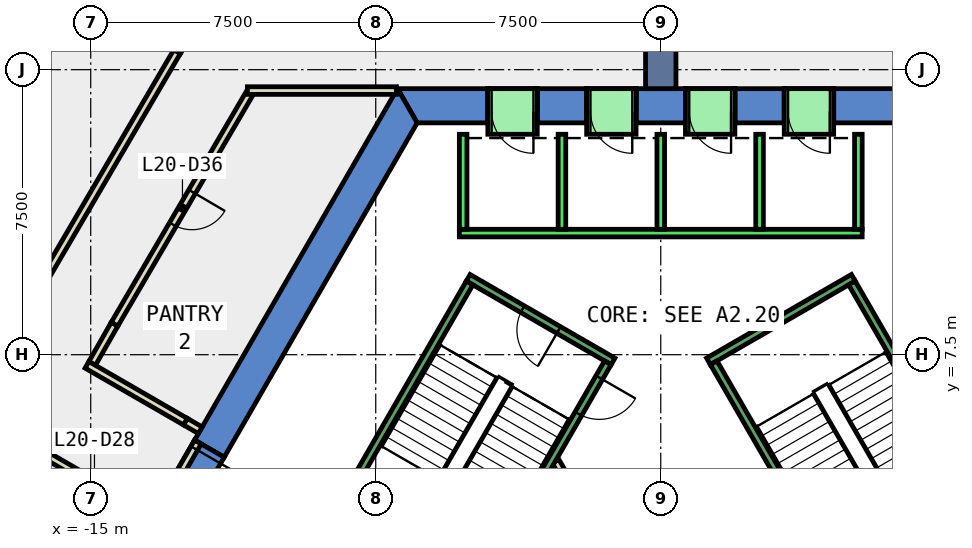
"""IFC4 building model, lengths in metres.
Left out: names, types, materials, properties, quantities, classifications, styles, units other than length and angle.
Written with IfcOpenShell. Run it as: python <this file> out.ifc"""

import sys

from ifc_helpers import new_model, si_unit, direction, frame, frame_2d, origin, place, context, subcontext, project, spatial, polyline, rectangle, outline, extrude, element, fill, save


model = new_model("IFC4")
c1 = context("Model", 3, precision=1e-05, world=origin(), true_north=direction((0.0, 1.0)))
c2 = subcontext(c1, "Body", "Model", "MODEL_VIEW")
j1 = project(units=[si_unit("LENGTHUNIT", "METRE"), si_unit("PLANEANGLEUNIT", "RADIAN")], contexts=[c1])
p1 = place(None, origin())
s1 = spatial("IfcSite", under=j1, at=p1, CompositionType="ELEMENT")
p2 = place(p1, origin())
s2 = spatial("IfcBuilding", under=s1, at=p2, CompositionType="ELEMENT")
p3 = place(p2, frame((0.0, 0.0, 95.0)))
s3 = spatial("IfcBuildingStorey", under=s2, at=p3, CompositionType="ELEMENT", Elevation=95.0)
p4 = place(p3, frame((0.0, 0.0, -0.4)))
e1 = element("IfcWall", 1, at=p4, inside=s3, PredefinedType="SHEAR", context=c2, shape_type="SweptSolid", body=[
    extrude(outline(polyline([(4.55, 14.5), (4.55, 13.6), (6.409, 13.6), (6.928, 14.5), (4.55, 14.5)])), origin(), (0.0, 0.0, 1.0), 4.2),
])
p5 = place(p3, frame((0.0, 0.0, -0.4)))
e2 = element("IfcWall", 2, at=p5, inside=s3, PredefinedType="SHEAR", context=c2, shape_type="SweptSolid", body=[
    extrude(outline(polyline([(1.95, 14.5), (1.95, 13.6), (3.25, 13.6), (3.25, 14.5), (1.95, 14.5)])), origin(), (0.0, 0.0, 1.0), 4.2),
])
p6 = place(p3, frame((0.0, 0.0, -0.4)))
e3 = element("IfcWall", 3, at=p6, inside=s3, PredefinedType="SHEAR", context=c2, shape_type="SweptSolid", body=[
    extrude(outline(polyline([(-0.65, 14.5), (-0.65, 13.6), (0.65, 13.6), (0.65, 14.5), (-0.65, 14.5)])), origin(), (0.0, 0.0, 1.0), 4.2),
])
p7 = place(p3, frame((0.0, 0.0, -0.4)))
e4 = element("IfcWall", 4, at=p7, inside=s3, PredefinedType="SHEAR", context=c2, shape_type="SweptSolid", body=[
    extrude(outline(polyline([(-3.25, 14.5), (-3.25, 13.6), (-1.95, 13.6), (-1.95, 14.5), (-3.25, 14.5)])), origin(), (0.0, 0.0, 1.0), 4.2),
])
p8 = place(p3, frame((0.0, 0.0, -0.4)))
e5 = element("IfcWall", 5, at=p8, inside=s3, PredefinedType="SHEAR", context=c2, shape_type="SweptSolid", body=[
    extrude(outline(polyline([(-4.55, 13.6), (-4.55, 14.5), (-6.928, 14.5), (-6.409, 13.6), (-4.55, 13.6)])), origin(), (0.0, 0.0, 1.0), 4.2),
])
p9 = place(p3, frame((0.0, 0.0, 3.6)))
e6 = element("IfcWall", 6, at=p9, inside=s3, PredefinedType="SHEAR", context=c2, shape_type="SweptSolid", body=[
    extrude(outline(polyline([(3.25, 14.5), (3.25, 13.6), (4.55, 13.6), (4.55, 14.5), (3.25, 14.5)])), origin(), (0.0, 0.0, 1.0), 0.2),
])
p10 = place(p3, frame((0.0, 0.0, 3.6)))
e7 = element("IfcWall", 7, at=p10, inside=s3, PredefinedType="SHEAR", context=c2, shape_type="SweptSolid", body=[
    extrude(outline(polyline([(0.65, 14.5), (0.65, 13.6), (1.95, 13.6), (1.95, 14.5), (0.65, 14.5)])), origin(), (0.0, 0.0, 1.0), 0.2),
])
p11 = place(p3, frame((0.0, 0.0, 3.6)))
e8 = element("IfcWall", 8, at=p11, inside=s3, PredefinedType="SHEAR", context=c2, shape_type="SweptSolid", body=[
    extrude(outline(polyline([(-1.95, 14.5), (-1.95, 13.6), (-0.65, 13.6), (-0.65, 14.5), (-1.95, 14.5)])), origin(), (0.0, 0.0, 1.0), 0.2),
])
p12 = place(p3, frame((0.0, 0.0, 3.6)))
e9 = element("IfcWall", 9, at=p12, inside=s3, PredefinedType="SHEAR", context=c2, shape_type="SweptSolid", body=[
    extrude(outline(polyline([(-4.55, 14.5), (-4.55, 13.6), (-3.25, 13.6), (-3.25, 14.5), (-4.55, 14.5)])), origin(), (0.0, 0.0, 1.0), 0.2),
])
p13 = place(p3, frame((0.0, 0.0, -0.4)))
e10 = element("IfcWall", 10, at=p13, inside=s3, PredefinedType="SHEAR", context=c2, shape_type="SweptSolid", body=[
    extrude(outline(polyline([(-12.267, 5.252), (-11.488, 4.802), (-6.409, 13.6), (-6.928, 14.5), (-12.267, 5.252)])), origin(), (0.0, 0.0, 1.0), 4.2),
])
p14 = place(p3, frame((0.0, 0.0, 3.6)))
e11 = element("IfcWall", 11, at=p14, inside=s3, PredefinedType="SHEAR", context=c2, shape_type="SweptSolid", body=[
    extrude(outline(polyline([(-13.267, 3.52), (-12.488, 3.07), (-11.488, 4.802), (-12.267, 5.252), (-13.267, 3.52)])), origin(), (0.0, 0.0, 1.0), 0.2),
])
p15 = place(p3, frame((0.0, 14.5, -0.4), z_axis=(0.0, 0.0, 1.0), x_axis=(0.0, 1.0, 0.0)))
e12 = element("IfcWall", 12, at=p15, inside=s3, PredefinedType="SHEAR", context=c2, shape_type="SweptSolid", body=[
    extrude(rectangle(XDim=9.0, YDim=0.8, at=frame_2d((4.5, 0.0))), origin(), (0.0, 0.0, 1.0), 4.2),
])
p16 = place(p3, frame((-10.797, 14.415, 0.0), z_axis=(0.0, 0.0, 1.0), x_axis=(-0.505008297342, -0.863114488128, 0.0)))
e13 = element("IfcWall", 13, at=p16, inside=s3, PredefinedType="PARTITIONING", context=c2, shape_type="SweptSolid", body=[
    extrude(rectangle(XDim=7.085, YDim=0.2, at=frame_2d((3.542, 0.0))), origin(), (0.0, 0.0, 1.0), 3.8),
])
p17 = place(p16, frame((3.043, 0.0, 0.0)))
e14 = element("IfcOpeningElement", 14, at=p17, cuts=e13, PredefinedType="OPENING", context=c2, shape_type="SweptSolid", body=[
    extrude(rectangle(XDim=1.0, YDim=2.1, at=frame_2d((0.5, 1.05))), frame((0.0, 0.11, 0.0), z_axis=(0.0, -1.0, 0.0), x_axis=(1.0, 0.0, 0.0)), (0.0, 0.0, 1.0), 0.22),
])
p18 = place(p3, frame((-14.375, 8.3, 0.0), z_axis=(0.0, 0.0, 1.0), x_axis=(-0.495074026382, -0.868850797549, 0.0)))
e15 = element("IfcWall", 15, at=p18, inside=s3, PredefinedType="PARTITIONING", context=c2, shape_type="SweptSolid", body=[
    extrude(rectangle(XDim=1.186, YDim=0.2, at=frame_2d((0.593, 0.0))), origin(), (0.0, 0.0, 1.0), 3.8),
])
p19 = place(p3, frame((-15.098, 7.233, 0.0), z_axis=(0.0, 0.0, 1.0), x_axis=(0.866101363304, -0.499868411168, 0.0)))
e16 = element("IfcWall", 16, at=p19, inside=s3, PredefinedType="PARTITIONING", context=c2, shape_type="SweptSolid", body=[
    extrude(rectangle(XDim=2.992, YDim=0.2, at=frame_2d((1.496, 0.0))), origin(), (0.0, 0.0, 1.0), 3.8),
])
p20 = place(p3, frame((-12.728, 15.473, 0.0), z_axis=(0.0, 0.0, 1.0), x_axis=(0.515010673306, 0.857183764651, 0.0)))
e17 = element("IfcWall", 17, at=p20, inside=s3, PredefinedType="PARTITIONING", context=c2, shape_type="SweptSolid", body=[
    extrude(rectangle(XDim=7.111, YDim=0.2, at=frame_2d((3.555, 0.0))), origin(), (0.0, 0.0, 1.0), 3.8),
])
p21 = place(p20, frame((3.13, 0.0, 0.0)))
e18 = element("IfcOpeningElement", 18, at=p21, cuts=e17, PredefinedType="OPENING", context=c2, shape_type="SweptSolid", body=[
    extrude(rectangle(XDim=1.0, YDim=2.1, at=frame_2d((0.5, 1.05))), frame((0.0, 0.11, 0.0), z_axis=(0.0, -1.0, 0.0), x_axis=(1.0, 0.0, 0.0)), (0.0, 0.0, 1.0), 0.22),
])
p22 = place(p3, frame((-16.281, 9.4, 0.0), z_axis=(0.0, 0.0, 1.0), x_axis=(0.504973069247, 0.863135099121, 0.0)))
e19 = element("IfcWall", 19, at=p22, inside=s3, PredefinedType="PARTITIONING", context=c2, shape_type="SweptSolid", body=[
    extrude(rectangle(XDim=7.036, YDim=0.2, at=frame_2d((3.518, 0.0))), origin(), (0.0, 0.0, 1.0), 3.8),
])
p23 = place(p3, frame((-2.771, 4.7, 0.0), z_axis=(0.0, 0.0, 1.0), x_axis=(0.499969479948, -0.866043023828, 0.0)))
e20 = element("IfcWall", 20, at=p23, inside=s3, PredefinedType="PARTITIONING", context=c2, shape_type="SweptSolid", body=[
    extrude(rectangle(XDim=4.99, YDim=0.2, at=frame_2d((2.495, 0.0))), origin(), (0.0, 0.0, 1.0), 3.8),
])
p24 = place(p23, frame((1.945, 0.0, 0.0)))
e21 = element("IfcOpeningElement", 21, at=p24, cuts=e20, PredefinedType="OPENING", context=c2, shape_type="SweptSolid", body=[
    extrude(rectangle(XDim=1.0, YDim=2.1, at=frame_2d((0.5, 1.05))), frame((0.0, 0.11, 0.0), z_axis=(0.0, -1.0, 0.0), x_axis=(1.0, 0.0, 0.0)), (0.0, 0.0, 1.0), 0.22),
])
p25 = place(p3, frame((-6.957, 14.45, 0.0), z_axis=(0.0, 0.0, 1.0), x_axis=(-1.0, 0.0, 0.0)))
e22 = element("IfcWall", 22, at=p25, inside=s3, PredefinedType="PARTITIONING", context=c2, shape_type="SweptSolid", body=[
    extrude(rectangle(XDim=3.92, YDim=0.2, at=frame_2d((1.96, 0.0))), origin(), (0.0, 0.0, 1.0), 3.8),
])
p26 = place(p3, frame((-12.18, 5.202, 0.0), z_axis=(0.0, 0.0, 1.0), x_axis=(-0.50002537861, -0.866010750942, 0.0)))
e23 = element("IfcWall", 23, at=p26, inside=s3, PredefinedType="PARTITIONING", context=c2, shape_type="SweptSolid", body=[
    extrude(rectangle(XDim=2.0, YDim=0.2, at=frame_2d((1.0, 0.0))), origin(), (0.0, 0.0, 1.0), 2.4),
])
p27 = place(p26, frame((0.19, 0.0, 0.0)))
e24 = element("IfcOpeningElement", 24, at=p27, cuts=e23, PredefinedType="OPENING", context=c2, shape_type="SweptSolid", body=[
    extrude(rectangle(XDim=1.8, YDim=2.1, at=frame_2d((0.9, 1.05))), frame((0.0, 0.11, 0.0), z_axis=(0.0, -1.0, 0.0), x_axis=(1.0, 0.0, 0.0)), (0.0, 0.0, 1.0), 0.22),
])
p28 = place(p3, frame((-12.506, 5.737, 0.0), z_axis=(0.0, 0.0, 1.0), x_axis=(0.865624510465, -0.500693725627, 0.0)))
e25 = element("IfcWall", 25, at=p28, inside=s3, PredefinedType="PARTITIONING", context=c2, shape_type="SweptSolid", body=[
    extrude(rectangle(XDim=0.449, YDim=0.2, at=frame_2d((0.225, 0.0))), origin(), (0.0, 0.0, 1.0), 2.4),
])
p29 = place(p3, frame((-13.807, 3.485, 0.0), z_axis=(0.0, 0.0, 1.0), x_axis=(-0.865947944451, 0.500134139508, 0.0)))
e26 = element("IfcWall", 26, at=p29, inside=s3, PredefinedType="PARTITIONING", context=c2, shape_type="SweptSolid", body=[
    extrude(rectangle(XDim=2.977, YDim=0.2, at=frame_2d((1.489, 0.0))), origin(), (0.0, 0.0, 1.0), 3.8),
])
p30 = place(p29, frame((0.764, 0.0, 0.0)))
e27 = element("IfcOpeningElement", 27, at=p30, cuts=e26, PredefinedType="OPENING", context=c2, shape_type="SweptSolid", body=[
    extrude(rectangle(XDim=1.0, YDim=2.1, at=frame_2d((0.5, 1.05))), frame((0.0, 0.11, 0.0), z_axis=(0.0, -1.0, 0.0), x_axis=(1.0, 0.0, 0.0)), (0.0, 0.0, 1.0), 0.22),
])
p31 = place(p3, frame((5.3, 10.7, 0.0), z_axis=(0.0, 0.0, 1.0), x_axis=(-1.0, 0.0, 0.0)))
e28 = element("IfcWall", 28, at=p31, inside=s3, PredefinedType="STANDARD", context=c2, shape_type="SweptSolid", body=[
    extrude(rectangle(XDim=10.6, YDim=0.2, at=frame_2d((5.3, 0.0))), origin(), (0.0, 0.0, 1.0), 3.8),
])
for number, where, z_axis, x_axis in (
    (29, (5.2, 10.8, 0.0), (0.0, 0.0, 1.0), (0.0, 1.0, 0.0)),
    (30, (2.6, 10.8, 0.0), (0.0, 0.0, 1.0), (0.0, 1.0, 0.0)),
    (31, (0.0, 10.8, 0.0), (0.0, 0.0, 1.0), (0.0, 1.0, 0.0)),
    (32, (-2.6, 10.8, 0.0), (0.0, 0.0, 1.0), (0.0, 1.0, 0.0)),
    (33, (-5.2, 10.8, 0.0), (0.0, 0.0, 1.0), (0.0, 1.0, 0.0)),
):
    element("IfcWall", number, at=place(p3, frame(where, z_axis=z_axis, x_axis=x_axis)), inside=s3, PredefinedType="STANDARD", context=c2, shape_type="SweptSolid", body=[
        extrude(rectangle(XDim=2.5, YDim=0.2, at=frame_2d((1.25, 0.0))), origin(), (0.0, 0.0, 1.0), 3.8),
    ])
p32 = place(p3, frame((4.55, 13.9, 0.0), z_axis=(0.0, 0.0, 1.0), x_axis=(-1.0, 0.0, 0.0)))
e34 = element("IfcWall", 34, at=p32, inside=s3, PredefinedType="STANDARD", context=c2, shape_type="SweptSolid", body=[
    extrude(rectangle(XDim=1.3, YDim=1.2, at=frame_2d((0.65, 0.0))), origin(), (0.0, 0.0, 1.0), 2.4),
])
p33 = place(p32, frame((0.1, 0.0, 0.0)))
e35 = element("IfcOpeningElement", 35, at=p33, cuts=e34, PredefinedType="OPENING", context=c2, shape_type="SweptSolid", body=[
    extrude(rectangle(XDim=1.1, YDim=2.3, at=frame_2d((0.55, 1.15))), frame((0.0, 0.61, 0.0), z_axis=(0.0, -1.0, 0.0), x_axis=(1.0, 0.0, 0.0)), (0.0, 0.0, 1.0), 1.22),
])
p34 = place(p3, frame((1.95, 13.9, 0.0), z_axis=(0.0, 0.0, 1.0), x_axis=(-1.0, 0.0, 0.0)))
e36 = element("IfcWall", 36, at=p34, inside=s3, PredefinedType="STANDARD", context=c2, shape_type="SweptSolid", body=[
    extrude(rectangle(XDim=1.3, YDim=1.2, at=frame_2d((0.65, 0.0))), origin(), (0.0, 0.0, 1.0), 2.4),
])
p35 = place(p34, frame((0.1, 0.0, 0.0)))
e37 = element("IfcOpeningElement", 37, at=p35, cuts=e36, PredefinedType="OPENING", context=c2, shape_type="SweptSolid", body=[
    extrude(rectangle(XDim=1.1, YDim=2.3, at=frame_2d((0.55, 1.15))), frame((0.0, 0.61, 0.0), z_axis=(0.0, -1.0, 0.0), x_axis=(1.0, 0.0, 0.0)), (0.0, 0.0, 1.0), 1.22),
])
p36 = place(p3, frame((-0.65, 13.9, 0.0), z_axis=(0.0, 0.0, 1.0), x_axis=(-1.0, 0.0, 0.0)))
e38 = element("IfcWall", 38, at=p36, inside=s3, PredefinedType="STANDARD", context=c2, shape_type="SweptSolid", body=[
    extrude(rectangle(XDim=1.3, YDim=1.2, at=frame_2d((0.65, 0.0))), origin(), (0.0, 0.0, 1.0), 2.4),
])
p37 = place(p36, frame((0.1, 0.0, 0.0)))
e39 = element("IfcOpeningElement", 39, at=p37, cuts=e38, PredefinedType="OPENING", context=c2, shape_type="SweptSolid", body=[
    extrude(rectangle(XDim=1.1, YDim=2.3, at=frame_2d((0.55, 1.15))), frame((0.0, 0.61, 0.0), z_axis=(0.0, -1.0, 0.0), x_axis=(1.0, 0.0, 0.0)), (0.0, 0.0, 1.0), 1.22),
])
p38 = place(p3, frame((-3.25, 13.9, 0.0), z_axis=(0.0, 0.0, 1.0), x_axis=(-1.0, 0.0, 0.0)))
e40 = element("IfcWall", 40, at=p38, inside=s3, PredefinedType="STANDARD", context=c2, shape_type="SweptSolid", body=[
    extrude(rectangle(XDim=1.3, YDim=1.2, at=frame_2d((0.65, 0.0))), origin(), (0.0, 0.0, 1.0), 2.4),
])
p39 = place(p38, frame((0.1, 0.0, 0.0)))
e41 = element("IfcOpeningElement", 41, at=p39, cuts=e40, PredefinedType="OPENING", context=c2, shape_type="SweptSolid", body=[
    extrude(rectangle(XDim=1.1, YDim=2.3, at=frame_2d((0.55, 1.15))), frame((0.0, 0.61, 0.0), z_axis=(0.0, -1.0, 0.0), x_axis=(1.0, 0.0, 0.0)), (0.0, 0.0, 1.0), 1.22),
])
p40 = place(p3, frame((1.256, 7.324, 0.0), z_axis=(0.0, 0.0, 1.0), x_axis=(0.866046073146, 0.499964197906, 0.0)))
e42 = element("IfcWall", 42, at=p40, inside=s3, PredefinedType="STANDARD", context=c2, shape_type="SweptSolid", body=[
    extrude(rectangle(XDim=4.4, YDim=0.2, at=frame_2d((2.2, 0.0))), origin(), (0.0, 0.0, 1.0), 3.8),
])
p41 = place(p3, frame((4.843, 1.312, 0.0), z_axis=(0.0, 0.0, 1.0), x_axis=(-0.499963383562, 0.866046543262, 0.0)))
e43 = element("IfcWall", 43, at=p41, inside=s3, PredefinedType="STANDARD", context=c2, shape_type="SweptSolid", body=[
    extrude(rectangle(XDim=6.9, YDim=0.2, at=frame_2d((3.45, 0.0))), origin(), (0.0, 0.0, 1.0), 3.8),
])
p42 = place(p41, frame((0.45, 0.0, 0.0)))
e44 = element("IfcOpeningElement", 44, at=p42, cuts=e43, PredefinedType="OPENING", context=c2, shape_type="SweptSolid", body=[
    extrude(rectangle(XDim=1.1, YDim=2.2, at=frame_2d((0.55, 1.1))), frame((0.0, 0.11, 0.0), z_axis=(0.0, -1.0, 0.0), x_axis=(1.0, 0.0, 0.0)), (0.0, 0.0, 1.0), 0.22),
])
p43 = place(p3, frame((8.48, 3.412, 0.0), z_axis=(0.0, 0.0, 1.0), x_axis=(-0.499978703459, 0.866037698999, 0.0)))
e45 = element("IfcWall", 45, at=p43, inside=s3, PredefinedType="STANDARD", context=c2, shape_type="SweptSolid", body=[
    extrude(rectangle(XDim=6.9, YDim=0.2, at=frame_2d((3.45, 0.0))), origin(), (0.0, 0.0, 1.0), 3.8),
])
p44 = place(p3, frame((-1.256, 7.324, 0.0), z_axis=(0.0, 0.0, 1.0), x_axis=(-0.866046073146, 0.499964197906, 0.0)))
e46 = element("IfcWall", 46, at=p44, inside=s3, PredefinedType="STANDARD", context=c2, shape_type="SweptSolid", body=[
    extrude(rectangle(XDim=4.4, YDim=0.2, at=frame_2d((2.2, 0.0))), origin(), (0.0, 0.0, 1.0), 3.8),
])
p45 = place(p44, frame((1.65, 0.0, 0.0)))
e47 = element("IfcOpeningElement", 47, at=p45, cuts=e46, PredefinedType="OPENING", context=c2, shape_type="SweptSolid", body=[
    extrude(rectangle(XDim=1.1, YDim=2.2, at=frame_2d((0.55, 1.1))), frame((0.0, 0.11, 0.0), z_axis=(0.0, -1.0, 0.0), x_axis=(1.0, 0.0, 0.0)), (0.0, 0.0, 1.0), 0.22),
])
p46 = place(p3, frame((-1.393, 7.288, 0.0), z_axis=(0.0, 0.0, 1.0), x_axis=(-0.499963383562, -0.866046543262, 0.0)))
e48 = element("IfcWall", 48, at=p46, inside=s3, PredefinedType="STANDARD", context=c2, shape_type="SweptSolid", body=[
    extrude(rectangle(XDim=6.9, YDim=0.2, at=frame_2d((3.45, 0.0))), origin(), (0.0, 0.0, 1.0), 3.8),
])
p47 = place(p46, frame((0.45, 0.0, 0.0)))
e49 = element("IfcOpeningElement", 49, at=p47, cuts=e48, PredefinedType="OPENING", context=c2, shape_type="SweptSolid", body=[
    extrude(rectangle(XDim=1.1, YDim=2.2, at=frame_2d((0.55, 1.1))), frame((0.0, 0.11, 0.0), z_axis=(0.0, -1.0, 0.0), x_axis=(1.0, 0.0, 0.0)), (0.0, 0.0, 1.0), 0.22),
])
p48 = place(p3, frame((-5.03, 9.388, 0.0), z_axis=(0.0, 0.0, 1.0), x_axis=(-0.499978703459, -0.866037698999, 0.0)))
e50 = element("IfcWall", 50, at=p48, inside=s3, PredefinedType="STANDARD", context=c2, shape_type="SweptSolid", body=[
    extrude(rectangle(XDim=6.9, YDim=0.2, at=frame_2d((3.45, 0.0))), origin(), (0.0, 0.0, 1.0), 3.8),
])
p49 = place(p17, origin())
e51 = element("IfcDoor", 51, at=p49, inside=s3, OperationType="SINGLE_SWING_LEFT", PredefinedType="DOOR", context=c2, shape_type="SweptSolid", body=[
    extrude(rectangle(XDim=1.0, YDim=2.1, at=frame_2d((0.5, 1.05))), frame((0.0, 0.025, 0.0), z_axis=(0.0, -1.0, 0.0), x_axis=(1.0, 0.0, 0.0)), (0.0, 0.0, 1.0), 0.05),
])
fill(e14, e51)
p50 = place(p27, origin())
e52 = element("IfcDoor", 52, at=p50, inside=s3, OperationType="DOUBLE_DOOR_SINGLE_SWING", PredefinedType="DOOR", context=c2, shape_type="SweptSolid", body=[
    extrude(rectangle(XDim=1.8, YDim=2.1, at=frame_2d((0.9, 1.05))), frame((0.0, 0.025, 0.0), z_axis=(0.0, -1.0, 0.0), x_axis=(1.0, 0.0, 0.0)), (0.0, 0.0, 1.0), 0.05),
])
fill(e24, e52)
p51 = place(p33, origin())
e53 = element("IfcDoor", 53, at=p51, inside=s3, OperationType="SLIDING_TO_LEFT", PredefinedType="DOOR", context=c2, shape_type="SweptSolid", body=[
    extrude(rectangle(XDim=1.1, YDim=2.3, at=frame_2d((0.55, 1.15))), frame((0.0, 0.025, 0.0), z_axis=(0.0, -1.0, 0.0), x_axis=(1.0, 0.0, 0.0)), (0.0, 0.0, 1.0), 0.05),
])
fill(e35, e53)
p52 = place(p35, origin())
e54 = element("IfcDoor", 54, at=p52, inside=s3, OperationType="SLIDING_TO_LEFT", PredefinedType="DOOR", context=c2, shape_type="SweptSolid", body=[
    extrude(rectangle(XDim=1.1, YDim=2.3, at=frame_2d((0.55, 1.15))), frame((0.0, 0.025, 0.0), z_axis=(0.0, -1.0, 0.0), x_axis=(1.0, 0.0, 0.0)), (0.0, 0.0, 1.0), 0.05),
])
fill(e37, e54)
p53 = place(p37, origin())
e55 = element("IfcDoor", 55, at=p53, inside=s3, OperationType="SLIDING_TO_LEFT", PredefinedType="DOOR", context=c2, shape_type="SweptSolid", body=[
    extrude(rectangle(XDim=1.1, YDim=2.3, at=frame_2d((0.55, 1.15))), frame((0.0, 0.025, 0.0), z_axis=(0.0, -1.0, 0.0), x_axis=(1.0, 0.0, 0.0)), (0.0, 0.0, 1.0), 0.05),
])
fill(e39, e55)
p54 = place(p39, origin())
e56 = element("IfcDoor", 56, at=p54, inside=s3, OperationType="SLIDING_TO_LEFT", PredefinedType="DOOR", context=c2, shape_type="SweptSolid", body=[
    extrude(rectangle(XDim=1.1, YDim=2.3, at=frame_2d((0.55, 1.15))), frame((0.0, 0.025, 0.0), z_axis=(0.0, -1.0, 0.0), x_axis=(1.0, 0.0, 0.0)), (0.0, 0.0, 1.0), 0.05),
])
fill(e41, e56)
p55 = place(p47, origin())
e57 = element("IfcDoor", 57, at=p55, inside=s3, OperationType="SINGLE_SWING_LEFT", PredefinedType="DOOR", context=c2, shape_type="SweptSolid", body=[
    extrude(rectangle(XDim=1.1, YDim=2.2, at=frame_2d((0.55, 1.1))), frame((0.0, 0.025, 0.0), z_axis=(0.0, -1.0, 0.0), x_axis=(1.0, 0.0, 0.0)), (0.0, 0.0, 1.0), 0.05),
])
fill(e49, e57)
p56 = place(p45, origin())
e58 = element("IfcDoor", 58, at=p56, inside=s3, OperationType="SINGLE_SWING_LEFT", PredefinedType="DOOR", context=c2, shape_type="SweptSolid", body=[
    extrude(rectangle(XDim=1.1, YDim=2.2, at=frame_2d((0.55, 1.1))), frame((0.0, 0.025, 0.0), z_axis=(0.0, -1.0, 0.0), x_axis=(1.0, 0.0, 0.0)), (0.0, 0.0, 1.0), 0.05),
])
fill(e47, e58)
save(model, sys.argv[1])
